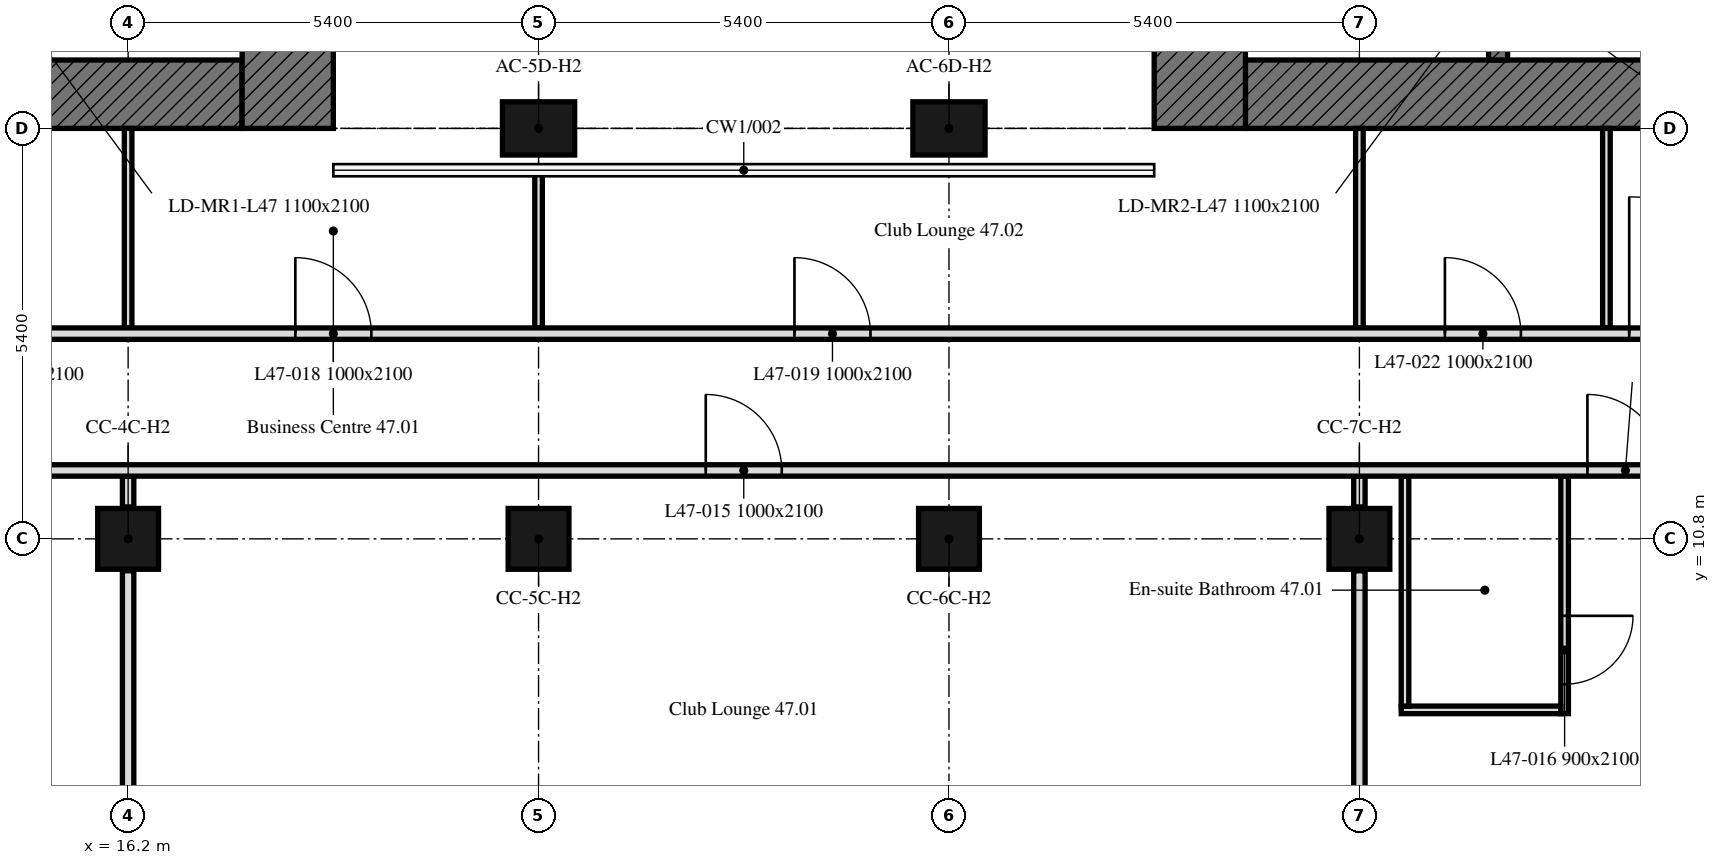
"""IFC4 building model, lengths in metres.
Left out: names, types, materials, properties, quantities, classifications, styles, units other than length and angle.
Written with IfcOpenShell. Run it as: python <this file> out.ifc"""

import sys

from ifc_helpers import new_model, si_unit, direction, frame, frame_2d, origin, origin_2d, place, context, subcontext, project, spatial, rectangle, extrude, element, fill, save


model = new_model("IFC4")
c1 = context("Model", 3, precision=1e-05, world=origin(), true_north=direction((0.0, 1.0)))
c2 = subcontext(c1, "Body", "Model", "MODEL_VIEW")
j1 = project(units=[si_unit("LENGTHUNIT", "METRE"), si_unit("PLANEANGLEUNIT", "RADIAN")], contexts=[c1])
p1 = place(None, origin())
s1 = spatial("IfcSite", under=j1, at=p1, CompositionType="ELEMENT")
p2 = place(p1, origin())
s2 = spatial("IfcBuilding", under=s1, at=p2, CompositionType="ELEMENT")
p3 = place(p2, frame((0.0, 0.0, 193.9)))
s3 = spatial("IfcBuildingStorey", under=s2, at=p3, CompositionType="ELEMENT", Elevation=193.9)
for number, where, z_axis, x_axis in (
    (1, (16.2, 10.8, 0.0), (0.0, 0.0, 1.0), (1.0, 0.0, 0.0)),
    (2, (21.6, 10.8, 0.0), (0.0, 0.0, 1.0), (1.0, 0.0, 0.0)),
    (3, (27.0, 10.8, 0.0), (0.0, 0.0, 1.0), (1.0, 0.0, 0.0)),
    (4, (32.4, 10.8, 0.0), (0.0, 0.0, 1.0), (1.0, 0.0, 0.0)),
):
    element("IfcColumn", number, at=place(p3, frame(where, z_axis=z_axis, x_axis=x_axis)), inside=s3, PredefinedType="COLUMN", context=c2, shape_type="SweptSolid", body=[
        extrude(rectangle(XDim=0.8, YDim=0.8, at=origin_2d()), origin(), (0.0, 0.0, 1.0), 3.0),
    ])
for number, where, z_axis, x_axis in (
    (5, (21.6, 16.2, 0.0), (0.0, 0.0, 1.0), (1.0, 0.0, 0.0)),
    (6, (27.0, 16.2, 0.0), (0.0, 0.0, 1.0), (1.0, 0.0, 0.0)),
):
    element("IfcColumn", number, at=place(p3, frame(where, z_axis=z_axis, x_axis=x_axis)), inside=s3, PredefinedType="COLUMN", context=c2, shape_type="SweptSolid", body=[
        extrude(rectangle(XDim=0.95, YDim=0.7, at=origin_2d()), origin(), (0.0, 0.0, 1.0), 3.0),
    ])
p4 = place(p3, frame((17.7, 16.65, 0.0), z_axis=(0.0, 0.0, 1.0), x_axis=(-1.0, 0.0, 0.0)))
e7 = element("IfcWall", 7, at=p4, inside=s3, PredefinedType="SOLIDWALL", context=c2, shape_type="SweptSolid", body=[
    extrude(rectangle(XDim=11.1, YDim=0.9, at=frame_2d((5.55, 0.0))), origin(), (0.0, 0.0, 1.0), 3.0),
])
p5 = place(p4, frame((5.55, 0.0, 0.0)))
e8 = element("IfcOpeningElement", 8, at=p5, cuts=e7, PredefinedType="OPENING", context=c2, shape_type="SweptSolid", body=[
    extrude(rectangle(XDim=2.0, YDim=2.4, at=frame_2d((1.0, 1.2))), frame((0.0, 0.45, 0.0), z_axis=(0.0, -1.0, 0.0), x_axis=(1.0, 0.0, 0.0)), (0.0, 0.0, 1.0), 0.9),
])
p6 = place(p3, frame((18.3, 32.4, 0.0), z_axis=(0.0, 0.0, 1.0), x_axis=(0.0, -1.0, 0.0)))
e9 = element("IfcWall", 9, at=p6, inside=s3, PredefinedType="SOLIDWALL", context=c2, shape_type="SweptSolid", body=[
    extrude(rectangle(XDim=16.2, YDim=1.2, at=frame_2d((8.1, 0.0))), origin(), (0.0, 0.0, 1.0), 3.0),
])
p7 = place(p3, frame((42.0, 16.65, 0.0), z_axis=(0.0, 0.0, 1.0), x_axis=(-1.0, 0.0, 0.0)))
e10 = element("IfcWall", 10, at=p7, inside=s3, PredefinedType="SOLIDWALL", context=c2, shape_type="SweptSolid", body=[
    extrude(rectangle(XDim=11.1, YDim=0.9, at=frame_2d((5.55, 0.0))), origin(), (0.0, 0.0, 1.0), 3.0),
])
p8 = place(p7, frame((3.55, 0.0, 0.0)))
e11 = element("IfcOpeningElement", 11, at=p8, cuts=e10, PredefinedType="OPENING", context=c2, shape_type="SweptSolid", body=[
    extrude(rectangle(XDim=2.0, YDim=2.4, at=frame_2d((1.0, 1.2))), frame((0.0, 0.45, 0.0), z_axis=(0.0, -1.0, 0.0), x_axis=(1.0, 0.0, 0.0)), (0.0, 0.0, 1.0), 0.9),
])
p9 = place(p3, frame((30.3, 16.2, 0.0), z_axis=(0.0, 0.0, 1.0), x_axis=(0.0, 1.0, 0.0)))
e12 = element("IfcWall", 12, at=p9, inside=s3, PredefinedType="SOLIDWALL", context=c2, shape_type="SweptSolid", body=[
    extrude(rectangle(XDim=16.2, YDim=1.2, at=frame_2d((8.1, 0.0))), origin(), (0.0, 0.0, 1.0), 3.0),
])
p10 = place(p3, frame((34.225, 17.1, 0.0), z_axis=(0.0, 0.0, 1.0), x_axis=(0.0, 1.0, 0.0)))
e13 = element("IfcWall", 13, at=p10, inside=s3, PredefinedType="SOLIDWALL", context=c2, shape_type="SweptSolid", body=[
    extrude(rectangle(XDim=14.4, YDim=0.25, at=frame_2d((7.2, 0.0))), origin(), (0.0, 0.0, 1.0), 3.0),
])
p11 = place(p10, frame((13.15, 0.0, 0.0)))
e14 = element("IfcOpeningElement", 14, at=p11, cuts=e13, PredefinedType="OPENING", context=c2, shape_type="SweptSolid", body=[
    extrude(rectangle(XDim=1.0, YDim=2.1, at=frame_2d((0.5, 1.05))), frame((0.0, 0.125, 0.0), z_axis=(0.0, -1.0, 0.0), x_axis=(1.0, 0.0, 0.0)), (0.0, 0.0, 1.0), 0.25),
])
p12 = place(p10, frame((0.6, 0.0, 0.0)))
e15 = element("IfcOpeningElement", 15, at=p12, cuts=e13, PredefinedType="OPENING", context=c2, shape_type="SweptSolid", body=[
    extrude(rectangle(XDim=1.1, YDim=2.1, at=frame_2d((0.55, 1.05))), frame((0.0, 0.125, 0.0), z_axis=(0.0, -1.0, 0.0), x_axis=(1.0, 0.0, 0.0)), (0.0, 0.0, 1.0), 0.25),
])
p13 = place(p10, frame((3.25, 0.0, 0.0)))
e16 = element("IfcOpeningElement", 16, at=p13, cuts=e13, PredefinedType="OPENING", context=c2, shape_type="SweptSolid", body=[
    extrude(rectangle(XDim=0.9, YDim=2.1, at=frame_2d((0.45, 1.05))), frame((0.0, 0.125, 0.0), z_axis=(0.0, -1.0, 0.0), x_axis=(1.0, 0.0, 0.0)), (0.0, 0.0, 1.0), 0.25),
])
p14 = place(p3, frame((16.2, 6.151, 0.0), z_axis=(0.0, 0.0, 1.0), x_axis=(0.0, 1.0, 0.0)))
e17 = element("IfcWall", 17, at=p14, inside=s3, PredefinedType="PARTITIONING", context=c2, shape_type="SweptSolid", body=[
    extrude(rectangle(XDim=4.229, YDim=0.15, at=frame_2d((2.115, 0.0))), origin(), (0.0, 0.0, 1.0), 3.0),
])
p15 = place(p3, frame((16.2, 11.22, 0.0), z_axis=(0.0, 0.0, 1.0), x_axis=(0.0, 1.0, 0.0)))
e18 = element("IfcWall", 18, at=p15, inside=s3, PredefinedType="PARTITIONING", context=c2, shape_type="SweptSolid", body=[
    extrude(rectangle(XDim=0.405, YDim=0.15, at=frame_2d((0.203, 0.0))), origin(), (0.0, 0.0, 1.0), 3.0),
])
p16 = place(p3, frame((32.4, 6.151, 0.0), z_axis=(0.0, 0.0, 1.0), x_axis=(0.0, 1.0, 0.0)))
e19 = element("IfcWall", 19, at=p16, inside=s3, PredefinedType="PARTITIONING", context=c2, shape_type="SweptSolid", body=[
    extrude(rectangle(XDim=4.229, YDim=0.15, at=frame_2d((2.115, 0.0))), origin(), (0.0, 0.0, 1.0), 3.0),
])
p17 = place(p3, frame((32.4, 11.22, 0.0), z_axis=(0.0, 0.0, 1.0), x_axis=(0.0, 1.0, 0.0)))
e20 = element("IfcWall", 20, at=p17, inside=s3, PredefinedType="PARTITIONING", context=c2, shape_type="SweptSolid", body=[
    extrude(rectangle(XDim=0.405, YDim=0.15, at=frame_2d((0.203, 0.0))), origin(), (0.0, 0.0, 1.0), 3.0),
])
p18 = place(p3, frame((35.1, 11.625, 0.0), z_axis=(0.0, 0.0, 1.0), x_axis=(0.0, -1.0, 0.0)))
e21 = element("IfcWall", 21, at=p18, inside=s3, PredefinedType="PARTITIONING", context=c2, shape_type="SweptSolid", body=[
    extrude(rectangle(XDim=3.125, YDim=0.1, at=frame_2d((1.562, 0.0))), origin(), (0.0, 0.0, 1.0), 3.0),
])
p19 = place(p18, frame((1.837, 0.0, 0.0)))
e22 = element("IfcOpeningElement", 22, at=p19, cuts=e21, PredefinedType="OPENING", context=c2, shape_type="SweptSolid", body=[
    extrude(rectangle(XDim=0.9, YDim=2.1, at=frame_2d((0.45, 1.05))), frame((0.0, 0.05, 0.0), z_axis=(0.0, -1.0, 0.0), x_axis=(1.0, 0.0, 0.0)), (0.0, 0.0, 1.0), 0.1),
])
p20 = place(p3, frame((35.05, 8.55, 0.0), z_axis=(0.0, 0.0, 1.0), x_axis=(-1.0, 0.0, 0.0)))
e23 = element("IfcWall", 23, at=p20, inside=s3, PredefinedType="PARTITIONING", context=c2, shape_type="SweptSolid", body=[
    extrude(rectangle(XDim=2.1, YDim=0.1, at=frame_2d((1.05, 0.0))), origin(), (0.0, 0.0, 1.0), 3.0),
])
p21 = place(p3, frame((33.0, 8.6, 0.0), z_axis=(0.0, 0.0, 1.0), x_axis=(0.0, 1.0, 0.0)))
e24 = element("IfcWall", 24, at=p21, inside=s3, PredefinedType="PARTITIONING", context=c2, shape_type="SweptSolid", body=[
    extrude(rectangle(XDim=3.025, YDim=0.1, at=frame_2d((1.512, 0.0))), origin(), (0.0, 0.0, 1.0), 3.0),
])
p22 = place(p3, frame((6.151, 11.7, 0.0), z_axis=(0.0, 0.0, 1.0), x_axis=(1.0, 0.0, 0.0)))
e25 = element("IfcWall", 25, at=p22, inside=s3, PredefinedType="PARTITIONING", context=c2, shape_type="SweptSolid", body=[
    extrude(rectangle(XDim=41.698, YDim=0.15, at=frame_2d((20.849, 0.0))), origin(), (0.0, 0.0, 1.0), 3.0),
])
p23 = place(p22, frame((17.649, 0.0, 0.0)))
e26 = element("IfcOpeningElement", 26, at=p23, cuts=e25, PredefinedType="OPENING", context=c2, shape_type="SweptSolid", body=[
    extrude(rectangle(XDim=1.0, YDim=2.1, at=frame_2d((0.5, 1.05))), frame((0.0, 0.075, 0.0), z_axis=(0.0, -1.0, 0.0), x_axis=(1.0, 0.0, 0.0)), (0.0, 0.0, 1.0), 0.15),
])
p24 = place(p22, frame((1.449, 0.0, 0.0)))
e27 = element("IfcOpeningElement", 27, at=p24, cuts=e25, PredefinedType="OPENING", context=c2, shape_type="SweptSolid", body=[
    extrude(rectangle(XDim=1.0, YDim=2.1, at=frame_2d((0.5, 1.05))), frame((0.0, 0.075, 0.0), z_axis=(0.0, -1.0, 0.0), x_axis=(1.0, 0.0, 0.0)), (0.0, 0.0, 1.0), 0.15),
])
p25 = place(p22, frame((29.249, 0.0, 0.0)))
e28 = element("IfcOpeningElement", 28, at=p25, cuts=e25, PredefinedType="OPENING", context=c2, shape_type="SweptSolid", body=[
    extrude(rectangle(XDim=1.0, YDim=2.1, at=frame_2d((0.5, 1.05))), frame((0.0, 0.075, 0.0), z_axis=(0.0, -1.0, 0.0), x_axis=(1.0, 0.0, 0.0)), (0.0, 0.0, 1.0), 0.15),
])
p26 = place(p22, frame((37.954, 0.0, 0.0)))
e29 = element("IfcOpeningElement", 29, at=p26, cuts=e25, PredefinedType="OPENING", context=c2, shape_type="SweptSolid", body=[
    extrude(rectangle(XDim=1.0, YDim=2.1, at=frame_2d((0.5, 1.05))), frame((0.0, 0.075, 0.0), z_axis=(0.0, -1.0, 0.0), x_axis=(1.0, 0.0, 0.0)), (0.0, 0.0, 1.0), 0.15),
])
p27 = place(p3, frame((16.2, 16.2, 0.0), z_axis=(0.0, 0.0, 1.0), x_axis=(0.0, -1.0, 0.0)))
e30 = element("IfcWall", 30, at=p27, inside=s3, PredefinedType="PARTITIONING", context=c2, shape_type="SweptSolid", body=[
    extrude(rectangle(XDim=2.625, YDim=0.1, at=frame_2d((1.312, 0.0))), origin(), (0.0, 0.0, 1.0), 3.0),
])
p28 = place(p3, frame((21.6, 13.575, 0.0), z_axis=(0.0, 0.0, 1.0), x_axis=(0.0, 1.0, 0.0)))
e31 = element("IfcWall", 31, at=p28, inside=s3, PredefinedType="PARTITIONING", context=c2, shape_type="SweptSolid", body=[
    extrude(rectangle(XDim=2.13, YDim=0.1, at=frame_2d((1.065, 0.0))), origin(), (0.0, 0.0, 1.0), 3.0),
])
for number, where, z_axis, x_axis in (
    (32, (32.4, 13.575, 0.0), (0.0, 0.0, 1.0), (0.0, 1.0, 0.0)),
    (33, (35.65, 16.2, 0.0), (0.0, 0.0, 1.0), (0.0, -1.0, 0.0)),
):
    element("IfcWall", number, at=place(p3, frame(where, z_axis=z_axis, x_axis=x_axis)), inside=s3, PredefinedType="PARTITIONING", context=c2, shape_type="SweptSolid", body=[
        extrude(rectangle(XDim=2.625, YDim=0.1, at=frame_2d((1.312, 0.0))), origin(), (0.0, 0.0, 1.0), 3.0),
    ])
p29 = place(p3, frame((9.45, 13.5, 0.0), z_axis=(0.0, 0.0, 1.0), x_axis=(1.0, 0.0, 0.0)))
e34 = element("IfcWall", 34, at=p29, inside=s3, PredefinedType="PARTITIONING", context=c2, shape_type="SweptSolid", body=[
    extrude(rectangle(XDim=33.675, YDim=0.15, at=frame_2d((16.837, 0.0))), origin(), (0.0, 0.0, 1.0), 3.0),
])
p30 = place(p29, frame((8.95, 0.0, 0.0)))
e35 = element("IfcOpeningElement", 35, at=p30, cuts=e34, PredefinedType="OPENING", context=c2, shape_type="SweptSolid", body=[
    extrude(rectangle(XDim=1.0, YDim=2.1, at=frame_2d((0.5, 1.05))), frame((0.0, 0.075, 0.0), z_axis=(0.0, -1.0, 0.0), x_axis=(1.0, 0.0, 0.0)), (0.0, 0.0, 1.0), 0.15),
])
p31 = place(p29, frame((15.517, 0.0, 0.0)))
e36 = element("IfcOpeningElement", 36, at=p31, cuts=e34, PredefinedType="OPENING", context=c2, shape_type="SweptSolid", body=[
    extrude(rectangle(XDim=1.0, YDim=2.1, at=frame_2d((0.5, 1.05))), frame((0.0, 0.075, 0.0), z_axis=(0.0, -1.0, 0.0), x_axis=(1.0, 0.0, 0.0)), (0.0, 0.0, 1.0), 0.15),
])
p32 = place(p29, frame((24.075, 0.0, 0.0)))
e37 = element("IfcOpeningElement", 37, at=p32, cuts=e34, PredefinedType="OPENING", context=c2, shape_type="SweptSolid", body=[
    extrude(rectangle(XDim=1.0, YDim=2.1, at=frame_2d((0.5, 1.05))), frame((0.0, 0.075, 0.0), z_axis=(0.0, -1.0, 0.0), x_axis=(1.0, 0.0, 0.0)), (0.0, 0.0, 1.0), 0.15),
])
p33 = place(p29, frame((31.275, 0.0, 0.0)))
e38 = element("IfcOpeningElement", 38, at=p33, cuts=e34, PredefinedType="OPENING", context=c2, shape_type="SweptSolid", body=[
    extrude(rectangle(XDim=1.0, YDim=2.1, at=frame_2d((0.5, 1.05))), frame((0.0, 0.075, 0.0), z_axis=(0.0, -1.0, 0.0), x_axis=(1.0, 0.0, 0.0)), (0.0, 0.0, 1.0), 0.15),
])
p34 = place(p29, frame((4.625, 0.0, 0.0)))
e39 = element("IfcOpeningElement", 39, at=p34, cuts=e34, PredefinedType="OPENING", context=c2, shape_type="SweptSolid", body=[
    extrude(rectangle(XDim=1.0, YDim=2.1, at=frame_2d((0.5, 1.05))), frame((0.0, 0.075, 0.0), z_axis=(0.0, -1.0, 0.0), x_axis=(1.0, 0.0, 0.0)), (0.0, 0.0, 1.0), 0.15),
])
p35 = place(p29, frame((1.4, 0.0, 0.0)))
e40 = element("IfcOpeningElement", 40, at=p35, cuts=e34, PredefinedType="OPENING", context=c2, shape_type="SweptSolid", body=[
    extrude(rectangle(XDim=1.8, YDim=2.4, at=frame_2d((0.9, 1.2))), frame((0.0, 0.075, 0.0), z_axis=(0.0, -1.0, 0.0), x_axis=(1.0, 0.0, 0.0)), (0.0, 0.0, 1.0), 0.15),
])
p36 = place(p29, frame((26.5, 0.0, 0.0)))
e41 = element("IfcOpeningElement", 41, at=p36, cuts=e34, PredefinedType="OPENING", context=c2, shape_type="SweptSolid", body=[
    extrude(rectangle(XDim=1.8, YDim=2.4, at=frame_2d((0.9, 1.2))), frame((0.0, 0.075, 0.0), z_axis=(0.0, -1.0, 0.0), x_axis=(1.0, 0.0, 0.0)), (0.0, 0.0, 1.0), 0.15),
])
p37 = place(p23, origin())
e42 = element("IfcDoor", 42, at=p37, inside=s3, OperationType="SINGLE_SWING_RIGHT", PredefinedType="DOOR", context=c2, shape_type="SweptSolid", body=[
    extrude(rectangle(XDim=1.0, YDim=2.1, at=frame_2d((0.5, 1.05))), frame((0.0, 0.025, 0.0), z_axis=(0.0, -1.0, 0.0), x_axis=(1.0, 0.0, 0.0)), (0.0, 0.0, 1.0), 0.05),
])
fill(e26, e42)
p38 = place(p19, origin())
e43 = element("IfcDoor", 43, at=p38, inside=s3, OperationType="SINGLE_SWING_LEFT", PredefinedType="DOOR", context=c2, shape_type="SweptSolid", body=[
    extrude(rectangle(XDim=0.9, YDim=2.1, at=frame_2d((0.45, 1.05))), frame((0.0, 0.025, 0.0), z_axis=(0.0, -1.0, 0.0), x_axis=(1.0, 0.0, 0.0)), (0.0, 0.0, 1.0), 0.05),
])
fill(e22, e43)
p39 = place(p30, origin())
e44 = element("IfcDoor", 44, at=p39, inside=s3, OperationType="SINGLE_SWING_LEFT", PredefinedType="DOOR", context=c2, shape_type="SweptSolid", body=[
    extrude(rectangle(XDim=1.0, YDim=2.1, at=frame_2d((0.5, 1.05))), frame((0.0, 0.025, 0.0), z_axis=(0.0, -1.0, 0.0), x_axis=(1.0, 0.0, 0.0)), (0.0, 0.0, 1.0), 0.05),
])
fill(e35, e44)
p40 = place(p31, origin())
e45 = element("IfcDoor", 45, at=p40, inside=s3, OperationType="SINGLE_SWING_LEFT", PredefinedType="DOOR", context=c2, shape_type="SweptSolid", body=[
    extrude(rectangle(XDim=1.0, YDim=2.1, at=frame_2d((0.5, 1.05))), frame((0.0, 0.025, 0.0), z_axis=(0.0, -1.0, 0.0), x_axis=(1.0, 0.0, 0.0)), (0.0, 0.0, 1.0), 0.05),
])
fill(e36, e45)
p41 = place(p32, origin())
e46 = element("IfcDoor", 46, at=p41, inside=s3, OperationType="SINGLE_SWING_LEFT", PredefinedType="DOOR", context=c2, shape_type="SweptSolid", body=[
    extrude(rectangle(XDim=1.0, YDim=2.1, at=frame_2d((0.5, 1.05))), frame((0.0, 0.025, 0.0), z_axis=(0.0, -1.0, 0.0), x_axis=(1.0, 0.0, 0.0)), (0.0, 0.0, 1.0), 0.05),
])
fill(e37, e46)
p42 = place(p25, origin())
e47 = element("IfcDoor", 47, at=p42, inside=s3, OperationType="SINGLE_SWING_LEFT", PredefinedType="DOOR", context=c2, shape_type="SweptSolid", body=[
    extrude(rectangle(XDim=1.0, YDim=2.1, at=frame_2d((0.5, 1.05))), frame((0.0, 0.025, 0.0), z_axis=(0.0, -1.0, 0.0), x_axis=(1.0, 0.0, 0.0)), (0.0, 0.0, 1.0), 0.05),
])
fill(e28, e47)
p43 = place(p36, origin())
e48 = element("IfcDoor", 48, at=p43, inside=s3, OperationType="DOUBLE_DOOR_SINGLE_SWING", PredefinedType="DOOR", context=c2, shape_type="SweptSolid", body=[
    extrude(rectangle(XDim=1.8, YDim=2.4, at=frame_2d((0.9, 1.2))), frame((0.0, 0.025, 0.0), z_axis=(0.0, -1.0, 0.0), x_axis=(1.0, 0.0, 0.0)), (0.0, 0.0, 1.0), 0.05),
])
fill(e41, e48)
save(model, sys.argv[1])
